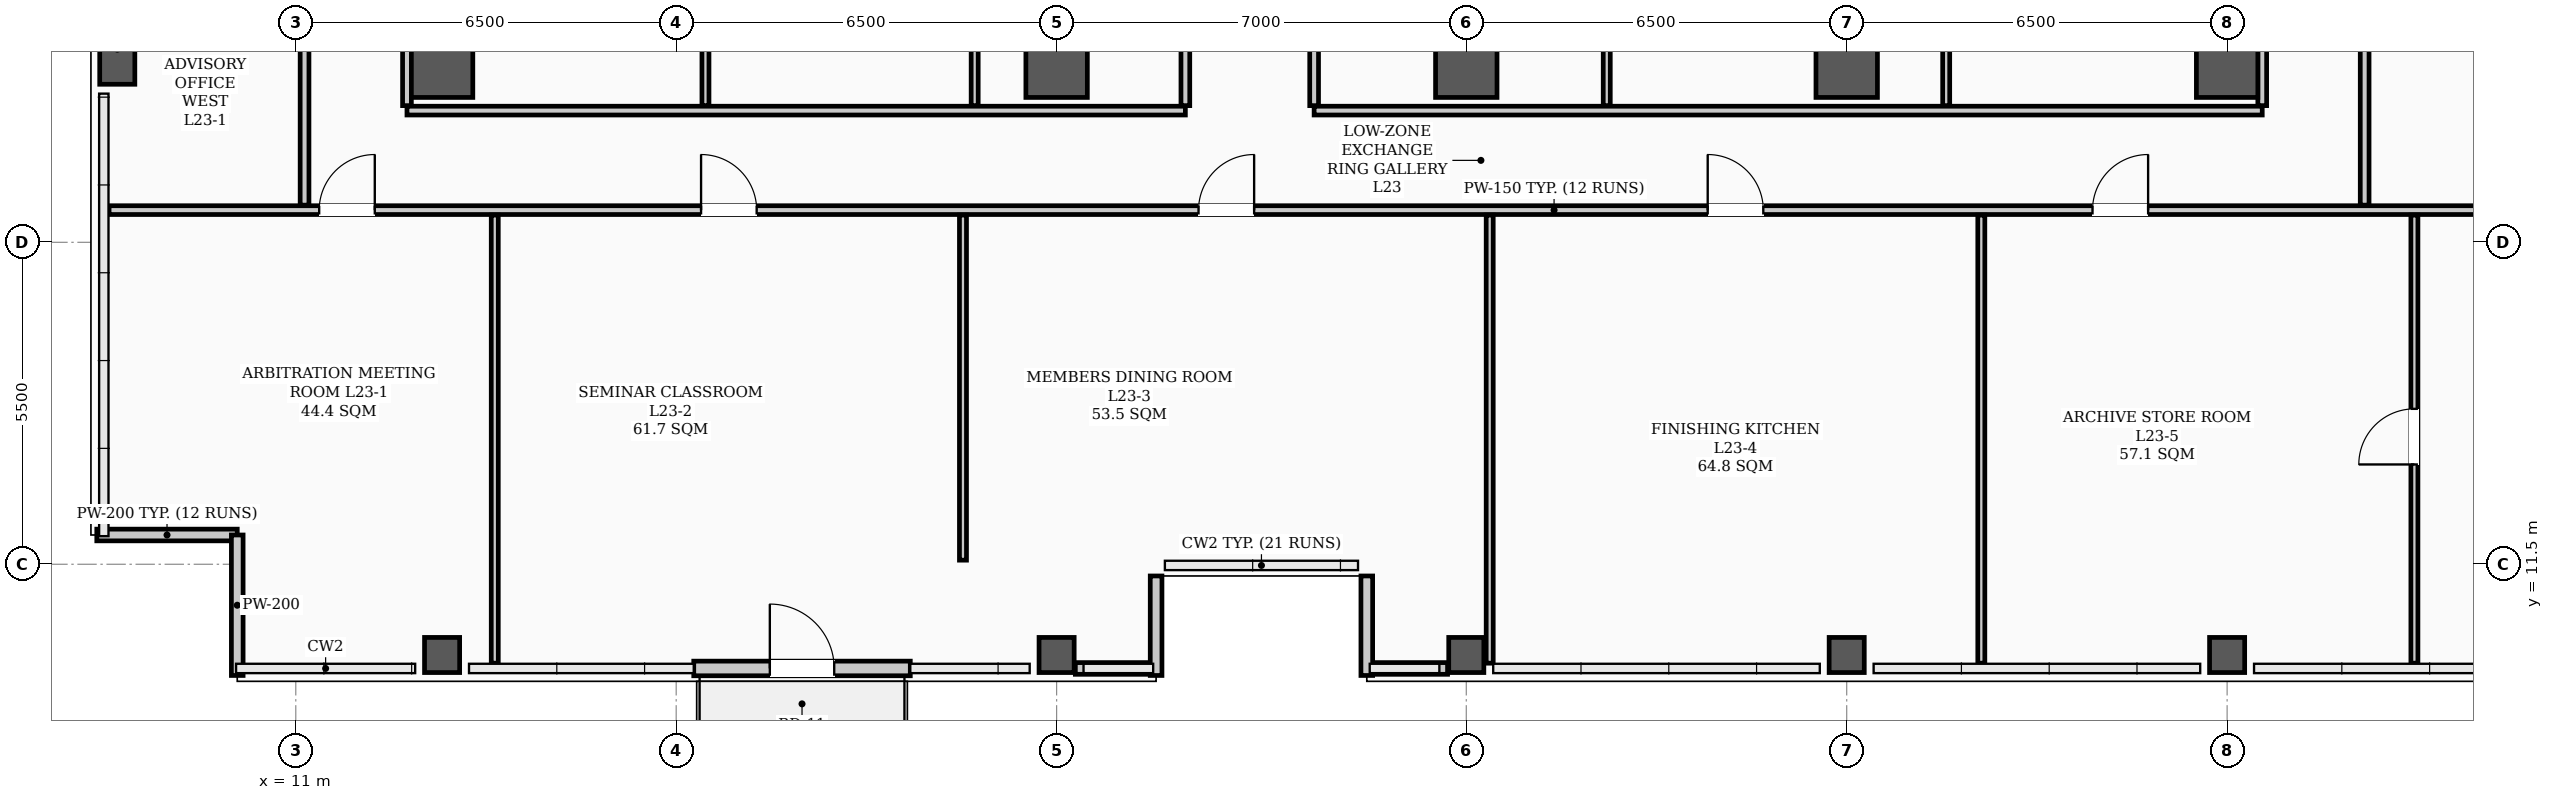
"""IFC4 building model, lengths in metres.
Left out: names, types, materials, properties, quantities, classifications, styles, units other than length and angle.
Written with IfcOpenShell. Run it as: python <this file> out.ifc"""

import sys

from ifc_helpers import new_model, si_unit, direction, frame, frame_2d, origin, origin_2d, place, context, subcontext, project, spatial, rectangle, hollow_rectangle, extrude, element, fill, save


model = new_model("IFC4")
c1 = context("Model", 3, precision=1e-05, world=origin(), true_north=direction((0.0, 1.0)))
c2 = subcontext(c1, "Body", "Model", "MODEL_VIEW")
j1 = project(units=[si_unit("LENGTHUNIT", "METRE"), si_unit("PLANEANGLEUNIT", "RADIAN")], contexts=[c1])
p1 = place(None, origin())
s1 = spatial("IfcSite", under=j1, at=p1, CompositionType="ELEMENT")
p2 = place(p1, origin())
s2 = spatial("IfcBuilding", under=s1, at=p2, CompositionType="ELEMENT")
p3 = place(p2, frame((0.0, 0.0, 92.8)))
s3 = spatial("IfcBuildingStorey", under=s2, at=p3, CompositionType="ELEMENT", Elevation=92.8)
for number, where, z_axis, x_axis in (
    (1, (13.5, 20.0, 0.0), (0.0, 0.0, 1.0), (1.0, 0.0, 0.0)),
    (2, (24.0, 20.0, 0.0), (0.0, 0.0, 1.0), (1.0, 0.0, 0.0)),
    (3, (31.0, 20.0, 0.0), (0.0, 0.0, 1.0), (1.0, 0.0, 0.0)),
    (4, (37.5, 20.0, 0.0), (0.0, 0.0, 1.0), (1.0, 0.0, 0.0)),
    (5, (44.0, 20.0, 0.0), (0.0, 0.0, 1.0), (1.0, 0.0, 0.0)),
):
    element("IfcColumn", number, at=place(p3, frame(where, z_axis=z_axis, x_axis=x_axis)), inside=s3, PredefinedType="COLUMN", context=c2, shape_type="SweptSolid", body=[
        extrude(hollow_rectangle(XDim=1.05, YDim=1.05, WallThickness=0.038, InnerFilletRadius=0.019, OuterFilletRadius=0.057, at=origin_2d()), origin(), (0.0, 0.0, 1.0), 3.9),
    ])
for number, where, z_axis, x_axis in (
    (6, (7.95, 20.0, 0.0), (0.0, 0.0, 1.0), (1.0, 0.0, 0.0)),
    (7, (13.5, 9.95, 0.0), (0.0, 0.0, 1.0), (1.0, 0.0, 0.0)),
    (8, (24.0, 9.95, 0.0), (0.0, 0.0, 1.0), (1.0, 0.0, 0.0)),
    (9, (31.0, 9.95, 0.0), (0.0, 0.0, 1.0), (1.0, 0.0, 0.0)),
    (10, (37.5, 9.95, 0.0), (0.0, 0.0, 1.0), (1.0, 0.0, 0.0)),
    (11, (44.0, 9.95, 0.0), (0.0, 0.0, 1.0), (1.0, 0.0, 0.0)),
):
    element("IfcColumn", number, at=place(p3, frame(where, z_axis=z_axis, x_axis=x_axis)), inside=s3, PredefinedType="COLUMN", context=c2, shape_type="SweptSolid", body=[
        extrude(hollow_rectangle(XDim=0.6, YDim=0.6, WallThickness=0.026, InnerFilletRadius=0.013, OuterFilletRadius=0.039, at=origin_2d()), origin(), (0.0, 0.0, 1.0), 3.9),
    ])
for number, where, z_axis, x_axis in (
    (12, (24.32, 9.72, 0.0), (0.0, 0.0, 1.0), (1.0, 0.0, 0.0)),
    (13, (29.35, 9.72, 0.0), (0.0, 0.0, 1.0), (1.0, 0.0, 0.0)),
):
    element("IfcWall", number, at=place(p3, frame(where, z_axis=z_axis, x_axis=x_axis)), inside=s3, PredefinedType="PARAPET", context=c2, shape_type="SweptSolid", body=[
        extrude(rectangle(XDim=1.33, YDim=0.2, at=frame_2d((0.665, 0.0))), origin(), (0.0, 0.0, 1.0), 1.2),
    ])
for number, where, z_axis, x_axis in (
    (14, (7.6, 12.0, 0.0), (0.0, 0.0, 1.0), (1.0, 0.0, 0.0)),
    (15, (10.0, 12.0, 0.0), (0.0, 0.0, 1.0), (0.0, -1.0, 0.0)),
):
    element("IfcWall", number, at=place(p3, frame(where, z_axis=z_axis, x_axis=x_axis)), inside=s3, PredefinedType="PARAPET", context=c2, shape_type="SweptSolid", body=[
        extrude(rectangle(XDim=2.4, YDim=0.2, at=frame_2d((1.2, 0.0))), origin(), (0.0, 0.0, 1.0), 1.2),
    ])
for number, where, z_axis, x_axis in (
    (16, (25.7, 9.6, 0.0), (0.0, 0.0, 1.0), (0.0, 1.0, 0.0)),
    (17, (29.3, 11.3, 0.0), (0.0, 0.0, 1.0), (0.0, -1.0, 0.0)),
):
    element("IfcWall", number, at=place(p3, frame(where, z_axis=z_axis, x_axis=x_axis)), inside=s3, PredefinedType="PARAPET", context=c2, shape_type="SweptSolid", body=[
        extrude(rectangle(XDim=1.7, YDim=0.2, at=frame_2d((0.85, 0.0))), origin(), (0.0, 0.0, 1.0), 1.2),
    ])
p4 = place(p3, frame((17.8, 9.72, 0.0), z_axis=(0.0, 0.0, 1.0), x_axis=(1.0, 0.0, 0.0)))
e18 = element("IfcWall", 18, at=p4, inside=s3, PredefinedType="STANDARD", context=c2, shape_type="SweptSolid", body=[
    extrude(rectangle(XDim=3.7, YDim=0.25, at=frame_2d((1.85, 0.0))), origin(), (0.0, 0.0, 1.0), 3.18),
])
p5 = place(p4, frame((1.3, 0.0, 0.0)))
e19 = element("IfcOpeningElement", 19, at=p5, cuts=e18, PredefinedType="OPENING", context=c2, shape_type="SweptSolid", body=[
    extrude(rectangle(XDim=1.1, YDim=2.2, at=frame_2d((0.55, 1.1))), frame((0.0, 0.135, 0.0), z_axis=(0.0, -1.0, 0.0), x_axis=(1.0, 0.0, 0.0)), (0.0, 0.0, 1.0), 0.27),
])
p6 = place(p3, frame((7.81, 17.55, 0.0), z_axis=(0.0, 0.0, 1.0), x_axis=(1.0, 0.0, 0.0)))
e20 = element("IfcWall", 20, at=p6, inside=s3, PredefinedType="PARTITIONING", context=c2, shape_type="SweptSolid", body=[
    extrude(rectangle(XDim=49.38, YDim=0.15, at=frame_2d((24.69, 0.0))), origin(), (0.0, 0.0, 1.0), 3.1),
])
p7 = place(p6, frame((3.59, 0.0, 0.0)))
e21 = element("IfcOpeningElement", 21, at=p7, cuts=e20, PredefinedType="OPENING", context=c2, shape_type="SweptSolid", body=[
    extrude(rectangle(XDim=0.95, YDim=2.08, at=frame_2d((0.475, 1.04))), frame((0.0, 0.085, 0.0), z_axis=(0.0, -1.0, 0.0), x_axis=(1.0, 0.0, 0.0)), (0.0, 0.0, 1.0), 0.17),
])
p8 = place(p6, frame((10.115, 0.0, 0.0)))
e22 = element("IfcOpeningElement", 22, at=p8, cuts=e20, PredefinedType="OPENING", context=c2, shape_type="SweptSolid", body=[
    extrude(rectangle(XDim=0.95, YDim=2.08, at=frame_2d((0.475, 1.04))), frame((0.0, 0.085, 0.0), z_axis=(0.0, -1.0, 0.0), x_axis=(1.0, 0.0, 0.0)), (0.0, 0.0, 1.0), 0.17),
])
p9 = place(p6, frame((18.615, 0.0, 0.0)))
e23 = element("IfcOpeningElement", 23, at=p9, cuts=e20, PredefinedType="OPENING", context=c2, shape_type="SweptSolid", body=[
    extrude(rectangle(XDim=0.95, YDim=2.08, at=frame_2d((0.475, 1.04))), frame((0.0, 0.085, 0.0), z_axis=(0.0, -1.0, 0.0), x_axis=(1.0, 0.0, 0.0)), (0.0, 0.0, 1.0), 0.17),
])
p10 = place(p6, frame((27.315, 0.0, 0.0)))
e24 = element("IfcOpeningElement", 24, at=p10, cuts=e20, PredefinedType="OPENING", context=c2, shape_type="SweptSolid", body=[
    extrude(rectangle(XDim=0.95, YDim=2.08, at=frame_2d((0.475, 1.04))), frame((0.0, 0.085, 0.0), z_axis=(0.0, -1.0, 0.0), x_axis=(1.0, 0.0, 0.0)), (0.0, 0.0, 1.0), 0.17),
])
p11 = place(p6, frame((33.89, 0.0, 0.0)))
e25 = element("IfcOpeningElement", 25, at=p11, cuts=e20, PredefinedType="OPENING", context=c2, shape_type="SweptSolid", body=[
    extrude(rectangle(XDim=0.95, YDim=2.08, at=frame_2d((0.475, 1.04))), frame((0.0, 0.085, 0.0), z_axis=(0.0, -1.0, 0.0), x_axis=(1.0, 0.0, 0.0)), (0.0, 0.0, 1.0), 0.17),
])
p12 = place(p3, frame((12.9, 19.25, 0.0), z_axis=(0.0, 0.0, 1.0), x_axis=(1.0, 0.0, 0.0)))
e26 = element("IfcWall", 26, at=p12, inside=s3, PredefinedType="PARTITIONING", context=c2, shape_type="SweptSolid", body=[
    extrude(rectangle(XDim=13.3, YDim=0.15, at=frame_2d((6.65, 0.0))), origin(), (0.0, 0.0, 1.0), 3.1),
])
p13 = place(p3, frame((28.4, 19.25, 0.0), z_axis=(0.0, 0.0, 1.0), x_axis=(1.0, 0.0, 0.0)))
e27 = element("IfcWall", 27, at=p13, inside=s3, PredefinedType="PARTITIONING", context=c2, shape_type="SweptSolid", body=[
    extrude(rectangle(XDim=16.2, YDim=0.15, at=frame_2d((8.1, 0.0))), origin(), (0.0, 0.0, 1.0), 3.1),
])
for number, where, z_axis, x_axis in (
    (28, (26.2, 19.335, 0.0), (0.0, 0.0, 1.0), (0.0, 1.0, 0.0)),
    (29, (28.4, 19.335, 0.0), (0.0, 0.0, 1.0), (0.0, 1.0, 0.0)),
):
    element("IfcWall", number, at=place(p3, frame(where, z_axis=z_axis, x_axis=x_axis)), inside=s3, PredefinedType="PARTITIONING", context=c2, shape_type="SweptSolid", body=[
        extrude(rectangle(XDim=7.38, YDim=0.15, at=frame_2d((3.69, 0.0))), origin(), (0.0, 0.0, 1.0), 3.0),
    ])
p14 = place(p3, frame((11.15, 17.635, 0.0), z_axis=(0.0, 0.0, 1.0), x_axis=(0.0, 1.0, 0.0)))
e30 = element("IfcWall", 30, at=p14, inside=s3, PredefinedType="PARTITIONING", context=c2, shape_type="SweptSolid", body=[
    extrude(rectangle(XDim=20.58, YDim=0.15, at=frame_2d((10.29, 0.0))), origin(), (0.0, 0.0, 1.0), 3.0),
])
p15 = place(p14, frame((4.965, 0.0, 0.0)))
e31 = element("IfcOpeningElement", 31, at=p15, cuts=e30, PredefinedType="OPENING", context=c2, shape_type="SweptSolid", body=[
    extrude(rectangle(XDim=0.95, YDim=2.08, at=frame_2d((0.475, 1.04))), frame((0.0, 0.085, 0.0), z_axis=(0.0, -1.0, 0.0), x_axis=(1.0, 0.0, 0.0)), (0.0, 0.0, 1.0), 0.17),
])
p16 = place(p14, frame((13.59, 0.0, 0.0)))
e32 = element("IfcOpeningElement", 32, at=p16, cuts=e30, PredefinedType="OPENING", context=c2, shape_type="SweptSolid", body=[
    extrude(rectangle(XDim=0.95, YDim=2.08, at=frame_2d((0.475, 1.04))), frame((0.0, 0.085, 0.0), z_axis=(0.0, -1.0, 0.0), x_axis=(1.0, 0.0, 0.0)), (0.0, 0.0, 1.0), 0.17),
])
p17 = place(p14, frame((18.44, 0.0, 0.0)))
e33 = element("IfcOpeningElement", 33, at=p17, cuts=e30, PredefinedType="OPENING", context=c2, shape_type="SweptSolid", body=[
    extrude(rectangle(XDim=0.95, YDim=2.08, at=frame_2d((0.475, 1.04))), frame((0.0, 0.085, 0.0), z_axis=(0.0, -1.0, 0.0), x_axis=(1.0, 0.0, 0.0)), (0.0, 0.0, 1.0), 0.17),
])
p18 = place(p3, frame((12.9, 19.335, 0.0), z_axis=(0.0, 0.0, 1.0), x_axis=(0.0, 1.0, 0.0)))
e34 = element("IfcWall", 34, at=p18, inside=s3, PredefinedType="PARTITIONING", context=c2, shape_type="SweptSolid", body=[
    extrude(rectangle(XDim=7.38, YDim=0.15, at=frame_2d((3.69, 0.0))), origin(), (0.0, 0.0, 1.0), 3.0),
])
p19 = place(p3, frame((46.35, 17.635, 0.0), z_axis=(0.0, 0.0, 1.0), x_axis=(0.0, 1.0, 0.0)))
e35 = element("IfcWall", 35, at=p19, inside=s3, PredefinedType="PARTITIONING", context=c2, shape_type="SweptSolid", body=[
    extrude(rectangle(XDim=20.58, YDim=0.15, at=frame_2d((10.29, 0.0))), origin(), (0.0, 0.0, 1.0), 3.0),
])
p20 = place(p19, frame((3.265, 0.0, 0.0)))
e36 = element("IfcOpeningElement", 36, at=p20, cuts=e35, PredefinedType="OPENING", context=c2, shape_type="SweptSolid", body=[
    extrude(rectangle(XDim=0.95, YDim=2.08, at=frame_2d((0.475, 1.04))), frame((0.0, 0.085, 0.0), z_axis=(0.0, -1.0, 0.0), x_axis=(1.0, 0.0, 0.0)), (0.0, 0.0, 1.0), 0.17),
])
p21 = place(p19, frame((8.29, 0.0, 0.0)))
e37 = element("IfcOpeningElement", 37, at=p21, cuts=e35, PredefinedType="OPENING", context=c2, shape_type="SweptSolid", body=[
    extrude(rectangle(XDim=0.95, YDim=2.08, at=frame_2d((0.475, 1.04))), frame((0.0, 0.085, 0.0), z_axis=(0.0, -1.0, 0.0), x_axis=(1.0, 0.0, 0.0)), (0.0, 0.0, 1.0), 0.17),
])
p22 = place(p19, frame((16.34, 0.0, 0.0)))
e38 = element("IfcOpeningElement", 38, at=p22, cuts=e35, PredefinedType="OPENING", context=c2, shape_type="SweptSolid", body=[
    extrude(rectangle(XDim=0.95, YDim=2.08, at=frame_2d((0.475, 1.04))), frame((0.0, 0.085, 0.0), z_axis=(0.0, -1.0, 0.0), x_axis=(1.0, 0.0, 0.0)), (0.0, 0.0, 1.0), 0.17),
])
p23 = place(p3, frame((44.6, 19.335, 0.0), z_axis=(0.0, 0.0, 1.0), x_axis=(0.0, 1.0, 0.0)))
e39 = element("IfcWall", 39, at=p23, inside=s3, PredefinedType="PARTITIONING", context=c2, shape_type="SweptSolid", body=[
    extrude(rectangle(XDim=7.38, YDim=0.15, at=frame_2d((3.69, 0.0))), origin(), (0.0, 0.0, 1.0), 3.0),
])
p24 = place(p3, frame((14.4, 9.81, 0.0), z_axis=(0.0, 0.0, 1.0), x_axis=(0.0, 1.0, 0.0)))
e40 = element("IfcWall", 40, at=p24, inside=s3, PredefinedType="PARTITIONING", context=c2, shape_type="SweptSolid", body=[
    extrude(rectangle(XDim=7.655, YDim=0.12, at=frame_2d((3.828, 0.0))), origin(), (0.0, 0.0, 1.0), 3.212),
])
p25 = place(p3, frame((22.4, 11.57, 0.0), z_axis=(0.0, 0.0, 1.0), x_axis=(0.0, 1.0, 0.0)))
e41 = element("IfcWall", 41, at=p25, inside=s3, PredefinedType="PARTITIONING", context=c2, shape_type="SweptSolid", body=[
    extrude(rectangle(XDim=5.895, YDim=0.12, at=frame_2d((2.948, 0.0))), origin(), (0.0, 0.0, 1.0), 3.3),
])
p26 = place(p3, frame((31.4, 9.81, 0.0), z_axis=(0.0, 0.0, 1.0), x_axis=(0.0, 1.0, 0.0)))
e42 = element("IfcWall", 42, at=p26, inside=s3, PredefinedType="PARTITIONING", context=c2, shape_type="SweptSolid", body=[
    extrude(rectangle(XDim=7.655, YDim=0.12, at=frame_2d((3.828, 0.0))), origin(), (0.0, 0.0, 1.0), 3.1),
])
p27 = place(p3, frame((39.8, 9.81, 0.0), z_axis=(0.0, 0.0, 1.0), x_axis=(0.0, 1.0, 0.0)))
e43 = element("IfcWall", 43, at=p27, inside=s3, PredefinedType="PARTITIONING", context=c2, shape_type="SweptSolid", body=[
    extrude(rectangle(XDim=7.655, YDim=0.12, at=frame_2d((3.828, 0.0))), origin(), (0.0, 0.0, 1.0), 3.212),
])
p28 = place(p3, frame((47.2, 9.81, 0.0), z_axis=(0.0, 0.0, 1.0), x_axis=(0.0, 1.0, 0.0)))
e44 = element("IfcWall", 44, at=p28, inside=s3, PredefinedType="PARTITIONING", context=c2, shape_type="SweptSolid", body=[
    extrude(rectangle(XDim=7.655, YDim=0.12, at=frame_2d((3.828, 0.0))), origin(), (0.0, 0.0, 1.0), 3.72),
])
p29 = place(p28, frame((3.395, 0.0, 0.0)))
e45 = element("IfcOpeningElement", 45, at=p29, cuts=e44, PredefinedType="OPENING", context=c2, shape_type="SweptSolid", body=[
    extrude(rectangle(XDim=0.95, YDim=2.08, at=frame_2d((0.475, 1.04))), frame((0.0, 0.07, 0.0), z_axis=(0.0, -1.0, 0.0), x_axis=(1.0, 0.0, 0.0)), (0.0, 0.0, 1.0), 0.14),
])
for number, where, z_axis, x_axis in (
    (46, (18.0, 19.335, 0.0), (0.0, 0.0, 1.0), (0.0, 1.0, 0.0)),
    (47, (22.6, 19.335, 0.0), (0.0, 0.0, 1.0), (0.0, 1.0, 0.0)),
    (48, (33.4, 19.335, 0.0), (0.0, 0.0, 1.0), (0.0, 1.0, 0.0)),
    (49, (39.2, 19.335, 0.0), (0.0, 0.0, 1.0), (0.0, 1.0, 0.0)),
):
    element("IfcWall", number, at=place(p3, frame(where, z_axis=z_axis, x_axis=x_axis)), inside=s3, PredefinedType="PARTITIONING", context=c2, shape_type="SweptSolid", body=[
        extrude(rectangle(XDim=7.38, YDim=0.12, at=frame_2d((3.69, 0.0))), origin(), (0.0, 0.0, 1.0), 3.0),
    ])
p30 = place(p5, origin())
e50 = element("IfcDoor", 50, at=p30, inside=s3, OperationType="SINGLE_SWING_LEFT", PredefinedType="DOOR", context=c2, shape_type="SweptSolid", body=[
    extrude(rectangle(XDim=1.1, YDim=2.2, at=frame_2d((0.55, 1.1))), frame((0.0, 0.025, 0.0), z_axis=(0.0, -1.0, 0.0), x_axis=(1.0, 0.0, 0.0)), (0.0, 0.0, 1.0), 0.05),
])
fill(e19, e50)
p31 = place(p7, origin())
e51 = element("IfcDoor", 51, at=p31, inside=s3, OperationType="SINGLE_SWING_RIGHT", PredefinedType="DOOR", context=c2, shape_type="SweptSolid", body=[
    extrude(rectangle(XDim=0.95, YDim=2.08, at=frame_2d((0.475, 1.04))), frame((0.0, 0.025, 0.0), z_axis=(0.0, -1.0, 0.0), x_axis=(1.0, 0.0, 0.0)), (0.0, 0.0, 1.0), 0.05),
])
fill(e21, e51)
p32 = place(p8, origin())
e52 = element("IfcDoor", 52, at=p32, inside=s3, OperationType="SINGLE_SWING_LEFT", PredefinedType="DOOR", context=c2, shape_type="SweptSolid", body=[
    extrude(rectangle(XDim=0.95, YDim=2.08, at=frame_2d((0.475, 1.04))), frame((0.0, 0.025, 0.0), z_axis=(0.0, -1.0, 0.0), x_axis=(1.0, 0.0, 0.0)), (0.0, 0.0, 1.0), 0.05),
])
fill(e22, e52)
p33 = place(p9, origin())
e53 = element("IfcDoor", 53, at=p33, inside=s3, OperationType="SINGLE_SWING_RIGHT", PredefinedType="DOOR", context=c2, shape_type="SweptSolid", body=[
    extrude(rectangle(XDim=0.95, YDim=2.08, at=frame_2d((0.475, 1.04))), frame((0.0, 0.025, 0.0), z_axis=(0.0, -1.0, 0.0), x_axis=(1.0, 0.0, 0.0)), (0.0, 0.0, 1.0), 0.05),
])
fill(e23, e53)
p34 = place(p10, origin())
e54 = element("IfcDoor", 54, at=p34, inside=s3, OperationType="SINGLE_SWING_LEFT", PredefinedType="DOOR", context=c2, shape_type="SweptSolid", body=[
    extrude(rectangle(XDim=0.95, YDim=2.08, at=frame_2d((0.475, 1.04))), frame((0.0, 0.025, 0.0), z_axis=(0.0, -1.0, 0.0), x_axis=(1.0, 0.0, 0.0)), (0.0, 0.0, 1.0), 0.05),
])
fill(e24, e54)
p35 = place(p11, origin())
e55 = element("IfcDoor", 55, at=p35, inside=s3, OperationType="SINGLE_SWING_RIGHT", PredefinedType="DOOR", context=c2, shape_type="SweptSolid", body=[
    extrude(rectangle(XDim=0.95, YDim=2.08, at=frame_2d((0.475, 1.04))), frame((0.0, 0.025, 0.0), z_axis=(0.0, -1.0, 0.0), x_axis=(1.0, 0.0, 0.0)), (0.0, 0.0, 1.0), 0.05),
])
fill(e25, e55)
p36 = place(p29, origin())
e56 = element("IfcDoor", 56, at=p36, inside=s3, OperationType="SINGLE_SWING_LEFT", PredefinedType="DOOR", context=c2, shape_type="SweptSolid", body=[
    extrude(rectangle(XDim=0.95, YDim=2.08, at=frame_2d((0.475, 1.04))), frame((0.0, 0.025, 0.0), z_axis=(0.0, -1.0, 0.0), x_axis=(1.0, 0.0, 0.0)), (0.0, 0.0, 1.0), 0.05),
])
fill(e45, e56)
save(model, sys.argv[1])
